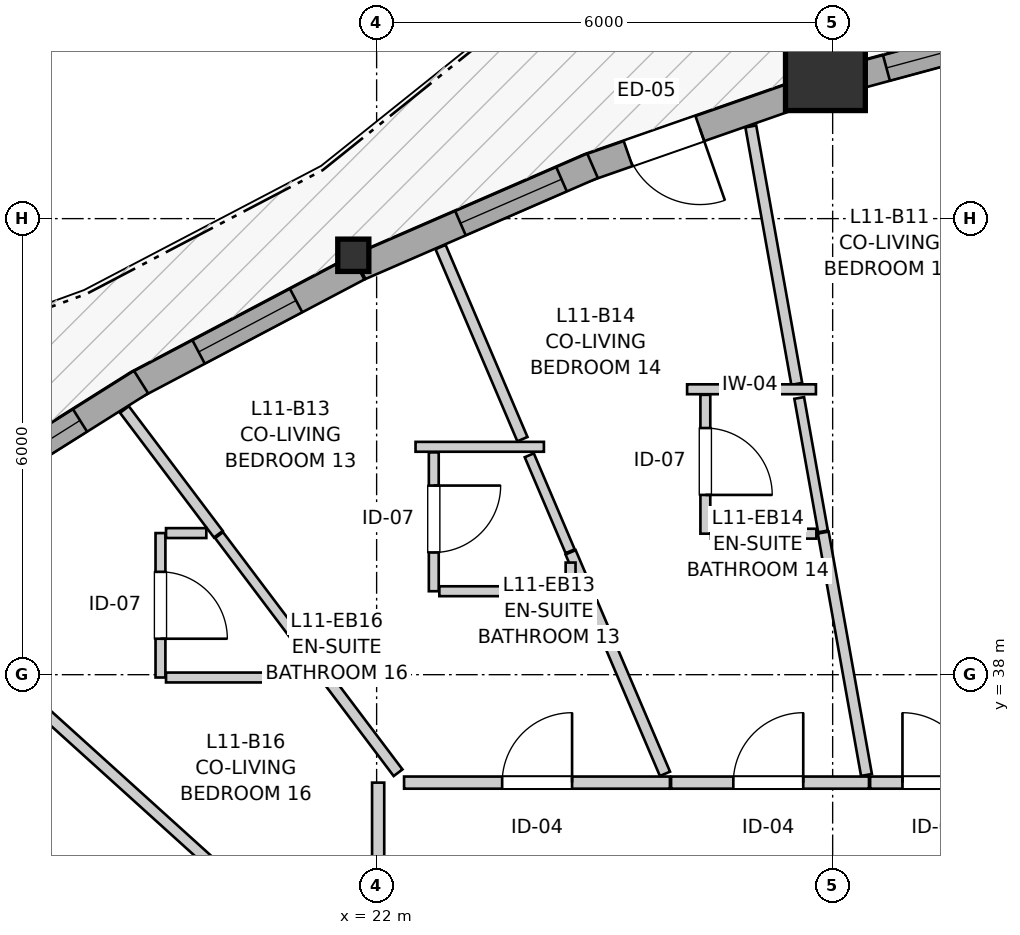
"""IFC4 building model, lengths in metres.
Left out: names, types, materials, properties, quantities, classifications, styles, units other than length and angle.
Written with IfcOpenShell. Run it as: python <this file> out.ifc"""

import sys

from ifc_helpers import new_model, si_unit, direction, frame, frame_2d, origin, origin_2d, place, context, subcontext, project, spatial, rectangle, i_section, extrude, source, transform, mapped, element, fill, save


model = new_model("IFC4")
c1 = context("Model", 3, precision=1e-05, world=origin(), true_north=direction((0.0, 1.0)))
c2 = subcontext(c1, "Body", "Model", "MODEL_VIEW")
j1 = project(units=[si_unit("LENGTHUNIT", "METRE"), si_unit("PLANEANGLEUNIT", "RADIAN")], contexts=[c1])
p1 = place(None, origin())
s1 = spatial("IfcSite", under=j1, at=p1, CompositionType="ELEMENT")
p2 = place(p1, origin())
s2 = spatial("IfcBuilding", under=s1, at=p2, CompositionType="ELEMENT")
p3 = place(p2, frame((0.0, 0.0, 39.8)))
s3 = spatial("IfcBuildingStorey", under=s2, at=p3, CompositionType="ELEMENT", Elevation=39.8)
m1 = source(origin(), c2, "Body", "SweptSolid", [
    extrude(rectangle(XDim=1.05, YDim=1.05, at=origin_2d()), origin(), (0.0, 0.0, 1.0), 2.94),
])
p4 = place(p3, frame((27.905, 45.947, 0.0), z_axis=(0.0, 0.0, 1.0), x_axis=(1.0, 0.0, 0.0)))
e1 = element("IfcColumn", 1, at=p4, inside=s3, PredefinedType="COLUMN", context=c2, shape_type="MappedRepresentation", body=[
    mapped(m1, transform((0.0, 0.0, 0.0), x_axis=(1.0, 0.0, 0.0), y_axis=(0.0, 1.0, 0.0), z_axis=(0.0, 0.0, 1.0), scale=1.0)),
])
m2 = source(origin(), c2, "Body", "SweptSolid", [
    extrude(i_section(OverallWidth=0.409, OverallDepth=0.425, WebThickness=0.03, FlangeThickness=0.048, FilletRadius=0.015, at=origin_2d()), origin(), (0.0, 0.0, 1.0), 2.94),
])
p5 = place(p3, frame((21.693, 43.518, 0.0), z_axis=(0.0, 0.0, 1.0), x_axis=(1.0, 0.0, 0.0)))
e2 = element("IfcColumn", 2, at=p5, inside=s3, PredefinedType="PILASTER", context=c2, shape_type="MappedRepresentation", body=[
    mapped(m2, transform((0.0, 0.0, 0.0), x_axis=(1.0, 0.0, 0.0), y_axis=(0.0, 1.0, 0.0), z_axis=(0.0, 0.0, 1.0), scale=1.0)),
])
p6 = place(p3, frame((31.281, 46.677, 0.0), z_axis=(0.0, 0.0, 1.0), x_axis=(-0.965445661484, -0.260604441101, 0.0)))
e3 = element("IfcWall", 3, at=p6, inside=s3, PredefinedType="SOLIDWALL", context=c2, shape_type="SweptSolid", body=[
    extrude(rectangle(XDim=3.15, YDim=0.35, at=frame_2d((1.575, 0.0))), origin(), (0.0, 0.0, 1.0), 2.42),
])
p7 = place(p6, frame((0.31, 0.0, 0.82)))
e4 = element("IfcOpeningElement", 4, at=p7, cuts=e3, PredefinedType="OPENING", context=c2, shape_type="SweptSolid", body=[
    extrude(rectangle(XDim=0.58, YDim=1.35, at=frame_2d((0.29, 0.675))), frame((0.0, 0.185, 0.0), z_axis=(0.0, -1.0, 0.0), x_axis=(1.0, 0.0, 0.0)), (0.0, 0.0, 1.0), 0.37),
])
p8 = place(p6, frame((1.215, 0.0, 0.82)))
e5 = element("IfcOpeningElement", 5, at=p8, cuts=e3, PredefinedType="OPENING", context=c2, shape_type="SweptSolid", body=[
    extrude(rectangle(XDim=1.45, YDim=1.25, at=frame_2d((0.725, 0.625))), frame((0.0, 0.185, 0.0), z_axis=(0.0, -1.0, 0.0), x_axis=(1.0, 0.0, 0.0)), (0.0, 0.0, 1.0), 0.37),
])
p9 = place(p3, frame((27.679, 45.683, 0.0), z_axis=(0.0, 0.0, 1.0), x_axis=(-0.944147093892, -0.32952430122, 0.0)))
e6 = element("IfcWall", 6, at=p9, inside=s3, PredefinedType="SOLIDWALL", context=c2, shape_type="SweptSolid", body=[
    extrude(rectangle(XDim=3.094, YDim=0.35, at=frame_2d((1.547, 0.0))), origin(), (0.0, 0.0, 1.0), 2.42),
])
p10 = place(p9, frame((1.511, 0.0, 0.0)))
e7 = element("IfcOpeningElement", 7, at=p10, cuts=e6, PredefinedType="OPENING", context=c2, shape_type="SweptSolid", body=[
    extrude(rectangle(XDim=1.0, YDim=2.1, at=frame_2d((0.5, 1.05))), frame((0.0, 0.185, 0.0), z_axis=(0.0, -1.0, 0.0), x_axis=(1.0, 0.0, 0.0)), (0.0, 0.0, 1.0), 0.37),
])
p11 = place(p3, frame((24.841, 44.696, 0.0), z_axis=(0.0, 0.0, 1.0), x_axis=(-0.917061912289, -0.398744842009, 0.0)))
e8 = element("IfcWall", 8, at=p11, inside=s3, PredefinedType="SOLIDWALL", context=c2, shape_type="SweptSolid", body=[
    extrude(rectangle(XDim=3.336, YDim=0.35, at=frame_2d((1.668, 0.0))), origin(), (0.0, 0.0, 1.0), 2.42),
])
p12 = place(p11, frame((0.445, 0.0, 0.82)))
e9 = element("IfcOpeningElement", 9, at=p12, cuts=e8, PredefinedType="OPENING", context=c2, shape_type="SweptSolid", body=[
    extrude(rectangle(XDim=1.45, YDim=1.25, at=frame_2d((0.725, 0.625))), frame((0.0, 0.185, 0.0), z_axis=(0.0, -1.0, 0.0), x_axis=(1.0, 0.0, 0.0)), (0.0, 0.0, 1.0), 0.37),
])
p13 = place(p3, frame((21.757, 43.354, 0.0), z_axis=(0.0, 0.0, 1.0), x_axis=(-0.884394035355, -0.466741031224, 0.0)))
e10 = element("IfcWall", 10, at=p13, inside=s3, PredefinedType="SOLIDWALL", context=c2, shape_type="SweptSolid", body=[
    extrude(rectangle(XDim=3.317, YDim=0.35, at=frame_2d((1.659, 0.0))), origin(), (0.0, 0.0, 1.0), 2.42),
])
p14 = place(p13, frame((0.924, 0.0, 0.82)))
e11 = element("IfcOpeningElement", 11, at=p14, cuts=e10, PredefinedType="OPENING", context=c2, shape_type="SweptSolid", body=[
    extrude(rectangle(XDim=1.45, YDim=1.25, at=frame_2d((0.725, 0.625))), frame((0.0, 0.185, 0.0), z_axis=(0.0, -1.0, 0.0), x_axis=(1.0, 0.0, 0.0)), (0.0, 0.0, 1.0), 0.37),
])
p15 = place(p3, frame((18.901, 41.85, 0.0), z_axis=(0.0, 0.0, 1.0), x_axis=(-0.846436796602, -0.532489201167, 0.0)))
e12 = element("IfcWall", 12, at=p15, inside=s3, PredefinedType="SOLIDWALL", context=c2, shape_type="SweptSolid", body=[
    extrude(rectangle(XDim=3.038, YDim=0.35, at=frame_2d((1.519, 0.0))), origin(), (0.0, 0.0, 1.0), 2.42),
])
p16 = place(p15, frame((0.948, 0.0, 0.82)))
e13 = element("IfcOpeningElement", 13, at=p16, cuts=e12, PredefinedType="OPENING", context=c2, shape_type="SweptSolid", body=[
    extrude(rectangle(XDim=1.45, YDim=1.25, at=frame_2d((0.725, 0.625))), frame((0.0, 0.185, 0.0), z_axis=(0.0, -1.0, 0.0), x_axis=(1.0, 0.0, 0.0)), (0.0, 0.0, 1.0), 0.37),
])
p17 = place(p3, frame((22.361, 36.58, 0.0), z_axis=(0.0, 0.0, 1.0), x_axis=(1.0, 0.0, 0.0)))
e14 = element("IfcWall", 14, at=p17, inside=s3, PredefinedType="PARTITIONING", context=c2, shape_type="SweptSolid", body=[
    extrude(rectangle(XDim=3.498, YDim=0.16, at=frame_2d((1.749, 0.0))), origin(), (0.0, 0.0, 1.0), 2.548),
])
p18 = place(p17, frame((1.291, 0.0, 0.0)))
e15 = element("IfcOpeningElement", 15, at=p18, cuts=e14, PredefinedType="OPENING", context=c2, shape_type="SweptSolid", body=[
    extrude(rectangle(XDim=0.92, YDim=2.1, at=frame_2d((0.46, 1.05))), frame((0.0, 0.09, 0.0), z_axis=(0.0, -1.0, 0.0), x_axis=(1.0, 0.0, 0.0)), (0.0, 0.0, 1.0), 0.18),
])
p19 = place(p3, frame((22.02, 33.512, 0.0), z_axis=(0.0, 0.0, 1.0), x_axis=(0.0, 1.0, 0.0)))
e16 = element("IfcWall", 16, at=p19, inside=s3, PredefinedType="PARTITIONING", context=c2, shape_type="SweptSolid", body=[
    extrude(rectangle(XDim=3.068, YDim=0.16, at=frame_2d((1.534, 0.0))), origin(), (0.0, 0.0, 1.0), 2.94),
])
p20 = place(p19, frame((1.084, 0.0, 0.0)))
e17 = element("IfcOpeningElement", 17, at=p20, cuts=e16, PredefinedType="OPENING", context=c2, shape_type="SweptSolid", body=[
    extrude(rectangle(XDim=0.92, YDim=2.1, at=frame_2d((0.46, 1.05))), frame((0.0, 0.09, 0.0), z_axis=(0.0, -1.0, 0.0), x_axis=(1.0, 0.0, 0.0)), (0.0, 0.0, 1.0), 0.18),
])
p21 = place(p3, frame((25.874, 36.58, 0.0), z_axis=(0.0, 0.0, 1.0), x_axis=(1.0, 0.0, 0.0)))
e18 = element("IfcWall", 18, at=p21, inside=s3, PredefinedType="PARTITIONING", context=c2, shape_type="SweptSolid", body=[
    extrude(rectangle(XDim=2.604, YDim=0.16, at=frame_2d((1.302, 0.0))), origin(), (0.0, 0.0, 1.0), 2.94),
])
p22 = place(p21, frame((0.819, 0.0, 0.0)))
e19 = element("IfcOpeningElement", 19, at=p22, cuts=e18, PredefinedType="OPENING", context=c2, shape_type="SweptSolid", body=[
    extrude(rectangle(XDim=0.92, YDim=2.1, at=frame_2d((0.46, 1.05))), frame((0.0, 0.09, 0.0), z_axis=(0.0, -1.0, 0.0), x_axis=(1.0, 0.0, 0.0)), (0.0, 0.0, 1.0), 0.18),
])
p23 = place(p3, frame((26.325, 41.682, 0.0), z_axis=(0.0, 0.0, 1.0), x_axis=(0.0, -1.0, 0.0)))
e20 = element("IfcWall", 20, at=p23, inside=s3, PredefinedType="PARTITIONING", context=c2, shape_type="SweptSolid", body=[
    extrude(rectangle(XDim=1.827, YDim=0.13, at=frame_2d((0.914, 0.0))), origin(), (0.0, 0.0, 1.0), 2.94),
])
p24 = place(p23, frame((0.437, 0.0, 0.0)))
e21 = element("IfcOpeningElement", 21, at=p24, cuts=e20, PredefinedType="OPENING", context=c2, shape_type="SweptSolid", body=[
    extrude(rectangle(XDim=0.88, YDim=2.05, at=frame_2d((0.44, 1.025))), frame((0.0, 0.075, 0.0), z_axis=(0.0, -1.0, 0.0), x_axis=(1.0, 0.0, 0.0)), (0.0, 0.0, 1.0), 0.15),
])
p25 = place(p3, frame((22.752, 40.925, 0.0), z_axis=(0.0, 0.0, 1.0), x_axis=(0.0, -1.0, 0.0)))
e22 = element("IfcWall", 22, at=p25, inside=s3, PredefinedType="PARTITIONING", context=c2, shape_type="SweptSolid", body=[
    extrude(rectangle(XDim=1.827, YDim=0.13, at=frame_2d((0.914, 0.0))), origin(), (0.0, 0.0, 1.0), 2.94),
])
p26 = place(p25, frame((0.437, 0.0, 0.0)))
e23 = element("IfcOpeningElement", 23, at=p26, cuts=e22, PredefinedType="OPENING", context=c2, shape_type="SweptSolid", body=[
    extrude(rectangle(XDim=0.88, YDim=2.05, at=frame_2d((0.44, 1.025))), frame((0.0, 0.075, 0.0), z_axis=(0.0, -1.0, 0.0), x_axis=(1.0, 0.0, 0.0)), (0.0, 0.0, 1.0), 0.15),
])
p27 = place(p3, frame((19.156, 39.863, 0.0), z_axis=(0.0, 0.0, 1.0), x_axis=(0.0, -1.0, 0.0)))
e24 = element("IfcWall", 24, at=p27, inside=s3, PredefinedType="PARTITIONING", context=c2, shape_type="SweptSolid", body=[
    extrude(rectangle(XDim=1.9, YDim=0.13, at=frame_2d((0.95, 0.0))), origin(), (0.0, 0.0, 1.0), 2.94),
])
p28 = place(p27, frame((0.51, 0.0, 0.0)))
e25 = element("IfcOpeningElement", 25, at=p28, cuts=e24, PredefinedType="OPENING", context=c2, shape_type="SweptSolid", body=[
    extrude(rectangle(XDim=0.88, YDim=2.05, at=frame_2d((0.44, 1.025))), frame((0.0, 0.075, 0.0), z_axis=(0.0, -1.0, 0.0), x_axis=(1.0, 0.0, 0.0)), (0.0, 0.0, 1.0), 0.15),
])
p29 = place(p3, frame((28.493, 36.58, 0.0), z_axis=(0.0, 0.0, 1.0), x_axis=(1.0, 0.0, 0.0)))
e26 = element("IfcWall", 26, at=p29, inside=s3, PredefinedType="PARTITIONING", context=c2, shape_type="SweptSolid", body=[
    extrude(rectangle(XDim=1.816, YDim=0.16, at=frame_2d((0.908, 0.0))), origin(), (0.0, 0.0, 1.0), 2.94),
])
p30 = place(p29, frame((0.426, 0.0, 0.0)))
e27 = element("IfcOpeningElement", 27, at=p30, cuts=e26, PredefinedType="OPENING", context=c2, shape_type="SweptSolid", body=[
    extrude(rectangle(XDim=0.92, YDim=2.1, at=frame_2d((0.46, 1.05))), frame((0.0, 0.09, 0.0), z_axis=(0.0, -1.0, 0.0), x_axis=(1.0, 0.0, 0.0)), (0.0, 0.0, 1.0), 0.18),
])
p31 = place(p3, frame((12.85, 37.347, 0.0), z_axis=(0.0, 0.0, 1.0), x_axis=(0.839070272759, -0.544023048567, 0.0)))
e28 = element("IfcWall", 28, at=p31, inside=s3, PredefinedType="PARTITIONING", context=c2, shape_type="SweptSolid", body=[
    extrude(rectangle(XDim=10.779, YDim=0.145, at=frame_2d((5.389, 0.0))), origin(), (0.0, 0.0, 1.0), 2.94),
])
p32 = place(p3, frame((15.516, 39.413, 0.0), z_axis=(0.0, 0.0, 1.0), x_axis=(0.741796419009, -0.670625135784, 0.0)))
e29 = element("IfcWall", 29, at=p32, inside=s3, PredefinedType="PARTITIONING", context=c2, shape_type="SweptSolid", body=[
    extrude(rectangle(XDim=8.586, YDim=0.145, at=frame_2d((4.293, 0.0))), origin(), (0.0, 0.0, 1.0), 2.94),
])
p33 = place(p3, frame((26.923, 45.213, 0.0), z_axis=(0.0, 0.0, 1.0), x_axis=(0.175687492323, -0.98444598889, 0.0)))
e30 = element("IfcWall", 30, at=p33, inside=s3, PredefinedType="PARTITIONING", context=c2, shape_type="SweptSolid", body=[
    extrude(rectangle(XDim=3.441, YDim=0.145, at=frame_2d((1.72, 0.0))), origin(), (0.0, 0.0, 1.0), 2.94),
])
p34 = place(p3, frame((27.876, 39.87, 0.0), z_axis=(0.0, 0.0, 1.0), x_axis=(0.175655014507, -0.984451784436, 0.0)))
e31 = element("IfcWall", 31, at=p34, inside=s3, PredefinedType="PARTITIONING", context=c2, shape_type="SweptSolid", body=[
    extrude(rectangle(XDim=3.24, YDim=0.145, at=frame_2d((1.62, 0.0))), origin(), (0.0, 0.0, 1.0), 2.94),
])
p35 = place(p3, frame((24.552, 39.61, 0.0), z_axis=(0.0, 0.0, 1.0), x_axis=(0.391974411108, -0.919976119819, 0.0)))
e32 = element("IfcWall", 32, at=p35, inside=s3, PredefinedType="PARTITIONING", context=c2, shape_type="SweptSolid", body=[
    extrude(rectangle(XDim=3.168, YDim=0.145, at=frame_2d((1.584, 0.0))), origin(), (0.0, 0.0, 1.0), 2.94),
])
p36 = place(p3, frame((22.841, 43.626, 0.0), z_axis=(0.0, 0.0, 1.0), x_axis=(0.392030625658, -0.919952166445, 0.0)))
e33 = element("IfcWall", 33, at=p36, inside=s3, PredefinedType="PARTITIONING", context=c2, shape_type="SweptSolid", body=[
    extrude(rectangle(XDim=2.747, YDim=0.145, at=frame_2d((1.374, 0.0))), origin(), (0.0, 0.0, 1.0), 2.94),
])
p37 = place(p3, frame((20.941, 38.49, 0.0), z_axis=(0.0, 0.0, 1.0), x_axis=(0.601733790382, -0.798696716853, 0.0)))
e34 = element("IfcWall", 34, at=p37, inside=s3, PredefinedType="PARTITIONING", context=c2, shape_type="SweptSolid", body=[
    extrude(rectangle(XDim=2.229, YDim=0.145, at=frame_2d((1.114, 0.0))), origin(), (0.0, 0.0, 1.0), 2.94),
])
p38 = place(p3, frame((18.681, 41.489, 0.0), z_axis=(0.0, 0.0, 1.0), x_axis=(0.601842551228, -0.79861476541, 0.0)))
e35 = element("IfcWall", 35, at=p38, inside=s3, PredefinedType="PARTITIONING", context=c2, shape_type="SweptSolid", body=[
    extrude(rectangle(XDim=2.055, YDim=0.145, at=frame_2d((1.027, 0.0))), origin(), (0.0, 0.0, 1.0), 2.94),
])
p39 = place(p3, frame((27.56, 41.641, 0.0), z_axis=(0.0, 0.0, 1.0), x_axis=(0.175463771609, -0.9844858886, 0.0)))
e36 = element("IfcWall", 36, at=p39, inside=s3, PredefinedType="PARTITIONING", context=c2, shape_type="SweptSolid", body=[
    extrude(rectangle(XDim=1.784, YDim=0.13, at=frame_2d((0.892, 0.0))), origin(), (0.0, 0.0, 1.0), 2.94),
])
p40 = place(p3, frame((22.825, 39.098, 0.0), z_axis=(0.0, 0.0, 1.0), x_axis=(1.0, 0.0, 0.0)))
e37 = element("IfcWall", 37, at=p40, inside=s3, PredefinedType="PARTITIONING", context=c2, shape_type="SweptSolid", body=[
    extrude(rectangle(XDim=1.727, YDim=0.13, at=frame_2d((0.864, 0.0))), origin(), (0.0, 0.0, 1.0), 2.94),
])
p41 = place(p3, frame((19.229, 37.963, 0.0), z_axis=(0.0, 0.0, 1.0), x_axis=(1.0, 0.0, 0.0)))
e38 = element("IfcWall", 38, at=p41, inside=s3, PredefinedType="PARTITIONING", context=c2, shape_type="SweptSolid", body=[
    extrude(rectangle(XDim=1.727, YDim=0.13, at=frame_2d((0.864, 0.0))), origin(), (0.0, 0.0, 1.0), 2.508),
])
p42 = place(p3, frame((19.927, 39.836, 0.0), z_axis=(0.0, 0.0, 1.0), x_axis=(0.601846185739, -0.798612026401, 0.0)))
e39 = element("IfcWall", 39, at=p42, inside=s3, PredefinedType="PARTITIONING", context=c2, shape_type="SweptSolid", body=[
    extrude(rectangle(XDim=1.67, YDim=0.13, at=frame_2d((0.835, 0.0))), origin(), (0.0, 0.0, 1.0), 2.94),
])
p43 = place(p3, frame((26.398, 39.855, 0.0), z_axis=(0.0, 0.0, 1.0), x_axis=(1.0, 0.0, 0.0)))
e40 = element("IfcWall", 40, at=p43, inside=s3, PredefinedType="PARTITIONING", context=c2, shape_type="SweptSolid", body=[
    extrude(rectangle(XDim=1.388, YDim=0.13, at=frame_2d((0.694, 0.0))), origin(), (0.0, 0.0, 1.0), 2.94),
])
p44 = place(p3, frame((24.009, 40.886, 0.0), z_axis=(0.0, 0.0, 1.0), x_axis=(0.39172821254, -0.920080978773, 0.0)))
e41 = element("IfcWall", 41, at=p44, inside=s3, PredefinedType="PARTITIONING", context=c2, shape_type="SweptSolid", body=[
    extrude(rectangle(XDim=1.372, YDim=0.13, at=frame_2d((0.686, 0.0))), origin(), (0.0, 0.0, 1.0), 2.94),
])
p45 = place(p3, frame((26.085, 41.755, 0.0), z_axis=(0.0, 0.0, 1.0), x_axis=(1.0, 0.0, 0.0)))
e42 = element("IfcWall", 42, at=p45, inside=s3, PredefinedType="PARTITIONING", context=c2, shape_type="SweptSolid", body=[
    extrude(rectangle(XDim=1.695, YDim=0.13, at=frame_2d((0.848, 0.0))), origin(), (0.0, 0.0, 1.0), 2.508),
])
p46 = place(p3, frame((22.512, 40.998, 0.0), z_axis=(0.0, 0.0, 1.0), x_axis=(1.0, 0.0, 0.0)))
e43 = element("IfcWall", 43, at=p46, inside=s3, PredefinedType="PARTITIONING", context=c2, shape_type="SweptSolid", body=[
    extrude(rectangle(XDim=1.689, YDim=0.13, at=frame_2d((0.844, 0.0))), origin(), (0.0, 0.0, 1.0), 2.94),
])
p47 = place(p3, frame((19.229, 39.863, 0.0), z_axis=(0.0, 0.0, 1.0), x_axis=(1.0, 0.0, 0.0)))
e44 = element("IfcWall", 44, at=p47, inside=s3, PredefinedType="PARTITIONING", context=c2, shape_type="SweptSolid", body=[
    extrude(rectangle(XDim=0.53, YDim=0.13, at=frame_2d((0.265, 0.0))), origin(), (0.0, 0.0, 1.0), 2.94),
])
p48 = place(p3, frame((24.552, 39.098, 0.0), z_axis=(0.0, 0.0, 1.0), x_axis=(0.0, 1.0, 0.0)))
e45 = element("IfcWall", 45, at=p48, inside=s3, PredefinedType="PARTITIONING", context=c2, shape_type="SweptSolid", body=[
    extrude(rectangle(XDim=0.377, YDim=0.13, at=frame_2d((0.188, 0.0))), origin(), (0.0, 0.0, 1.0), 2.94),
])
p49 = place(p3, frame((20.956, 37.963, 0.0), z_axis=(0.0, 0.0, 1.0), x_axis=(0.0, 1.0, 0.0)))
e46 = element("IfcWall", 46, at=p49, inside=s3, PredefinedType="PARTITIONING", context=c2, shape_type="SweptSolid", body=[
    extrude(rectangle(XDim=0.417, YDim=0.13, at=frame_2d((0.208, 0.0))), origin(), (0.0, 0.0, 1.0), 2.94),
])
m3 = source(origin(), c2, "Body", "SweptSolid", [
    extrude(rectangle(XDim=1.45, YDim=1.25, at=frame_2d((0.725, 0.625))), frame((0.0, 0.03, 0.0), z_axis=(0.0, -1.0, 0.0), x_axis=(1.0, 0.0, 0.0)), (0.0, 0.0, 1.0), 0.06),
])
p50 = place(p8, origin())
e47 = element("IfcWindow", 47, at=p50, inside=s3, PartitioningType="SINGLE_PANEL", PredefinedType="WINDOW", context=c2, shape_type="MappedRepresentation", body=[
    mapped(m3, transform((0.0, 0.0, 0.0), x_axis=(1.0, 0.0, 0.0), y_axis=(0.0, 1.0, 0.0), z_axis=(0.0, 0.0, 1.0), scale=1.0)),
])
fill(e5, e47)
p51 = place(p12, origin())
e48 = element("IfcWindow", 48, at=p51, inside=s3, PartitioningType="SINGLE_PANEL", PredefinedType="WINDOW", context=c2, shape_type="MappedRepresentation", body=[
    mapped(m3, transform((0.0, 0.0, 0.0), x_axis=(1.0, 0.0, 0.0), y_axis=(0.0, 1.0, 0.0), z_axis=(0.0, 0.0, 1.0), scale=1.0)),
])
fill(e9, e48)
p52 = place(p14, origin())
e49 = element("IfcWindow", 49, at=p52, inside=s3, PartitioningType="SINGLE_PANEL", PredefinedType="WINDOW", context=c2, shape_type="MappedRepresentation", body=[
    mapped(m3, transform((0.0, 0.0, 0.0), x_axis=(1.0, 0.0, 0.0), y_axis=(0.0, 1.0, 0.0), z_axis=(0.0, 0.0, 1.0), scale=1.0)),
])
fill(e11, e49)
p53 = place(p16, origin())
e50 = element("IfcWindow", 50, at=p53, inside=s3, PartitioningType="SINGLE_PANEL", PredefinedType="WINDOW", context=c2, shape_type="MappedRepresentation", body=[
    mapped(m3, transform((0.0, 0.0, 0.0), x_axis=(1.0, 0.0, 0.0), y_axis=(0.0, 1.0, 0.0), z_axis=(0.0, 0.0, 1.0), scale=1.0)),
])
fill(e13, e50)
m4 = source(origin(), c2, "Body", "SweptSolid", [
    extrude(rectangle(XDim=1.0, YDim=2.1, at=frame_2d((0.5, 1.05))), frame((0.0, 0.025, 0.0), z_axis=(0.0, -1.0, 0.0), x_axis=(1.0, 0.0, 0.0)), (0.0, 0.0, 1.0), 0.05),
])
p54 = place(p10, origin())
e51 = element("IfcDoor", 51, at=p54, inside=s3, OperationType="SINGLE_SWING_LEFT", PredefinedType="DOOR", context=c2, shape_type="MappedRepresentation", body=[
    mapped(m4, transform((0.0, 0.0, 0.0), x_axis=(1.0, 0.0, 0.0), y_axis=(0.0, 1.0, 0.0), z_axis=(0.0, 0.0, 1.0), scale=1.0)),
])
fill(e7, e51)
m5 = source(origin(), c2, "Body", "SweptSolid", [
    extrude(rectangle(XDim=0.92, YDim=2.1, at=frame_2d((0.46, 1.05))), frame((0.0, 0.025, 0.0), z_axis=(0.0, -1.0, 0.0), x_axis=(1.0, 0.0, 0.0)), (0.0, 0.0, 1.0), 0.05),
])
p55 = place(p18, origin())
e52 = element("IfcDoor", 52, at=p55, inside=s3, OperationType="SINGLE_SWING_RIGHT", PredefinedType="DOOR", context=c2, shape_type="MappedRepresentation", body=[
    mapped(m5, transform((0.0, 0.0, 0.0), x_axis=(1.0, 0.0, 0.0), y_axis=(0.0, 1.0, 0.0), z_axis=(0.0, 0.0, 1.0), scale=1.0)),
])
fill(e15, e52)
p56 = place(p22, origin())
e53 = element("IfcDoor", 53, at=p56, inside=s3, OperationType="SINGLE_SWING_RIGHT", PredefinedType="DOOR", context=c2, shape_type="MappedRepresentation", body=[
    mapped(m5, transform((0.0, 0.0, 0.0), x_axis=(1.0, 0.0, 0.0), y_axis=(0.0, 1.0, 0.0), z_axis=(0.0, 0.0, 1.0), scale=1.0)),
])
fill(e19, e53)
m6 = source(origin(), c2, "Body", "SweptSolid", [
    extrude(rectangle(XDim=0.88, YDim=2.05, at=frame_2d((0.44, 1.025))), frame((0.0, 0.025, 0.0), z_axis=(0.0, -1.0, 0.0), x_axis=(1.0, 0.0, 0.0)), (0.0, 0.0, 1.0), 0.05),
])
p57 = place(p24, origin())
e54 = element("IfcDoor", 54, at=p57, inside=s3, OperationType="SINGLE_SWING_RIGHT", PredefinedType="DOOR", context=c2, shape_type="MappedRepresentation", body=[
    mapped(m6, transform((0.0, 0.0, 0.0), x_axis=(1.0, 0.0, 0.0), y_axis=(0.0, 1.0, 0.0), z_axis=(0.0, 0.0, 1.0), scale=1.0)),
])
fill(e21, e54)
p58 = place(p26, origin())
e55 = element("IfcDoor", 55, at=p58, inside=s3, OperationType="SINGLE_SWING_LEFT", PredefinedType="DOOR", context=c2, shape_type="MappedRepresentation", body=[
    mapped(m6, transform((0.0, 0.0, 0.0), x_axis=(1.0, 0.0, 0.0), y_axis=(0.0, 1.0, 0.0), z_axis=(0.0, 0.0, 1.0), scale=1.0)),
])
fill(e23, e55)
p59 = place(p28, origin())
e56 = element("IfcDoor", 56, at=p59, inside=s3, OperationType="SINGLE_SWING_RIGHT", PredefinedType="DOOR", context=c2, shape_type="MappedRepresentation", body=[
    mapped(m6, transform((0.0, 0.0, 0.0), x_axis=(1.0, 0.0, 0.0), y_axis=(0.0, 1.0, 0.0), z_axis=(0.0, 0.0, 1.0), scale=1.0)),
])
fill(e25, e56)
p60 = place(p30, origin())
e57 = element("IfcDoor", 57, at=p60, inside=s3, OperationType="SINGLE_SWING_LEFT", PredefinedType="DOOR", context=c2, shape_type="MappedRepresentation", body=[
    mapped(m5, transform((0.0, 0.0, 0.0), x_axis=(1.0, 0.0, 0.0), y_axis=(0.0, 1.0, 0.0), z_axis=(0.0, 0.0, 1.0), scale=1.0)),
])
fill(e27, e57)
save(model, sys.argv[1])
